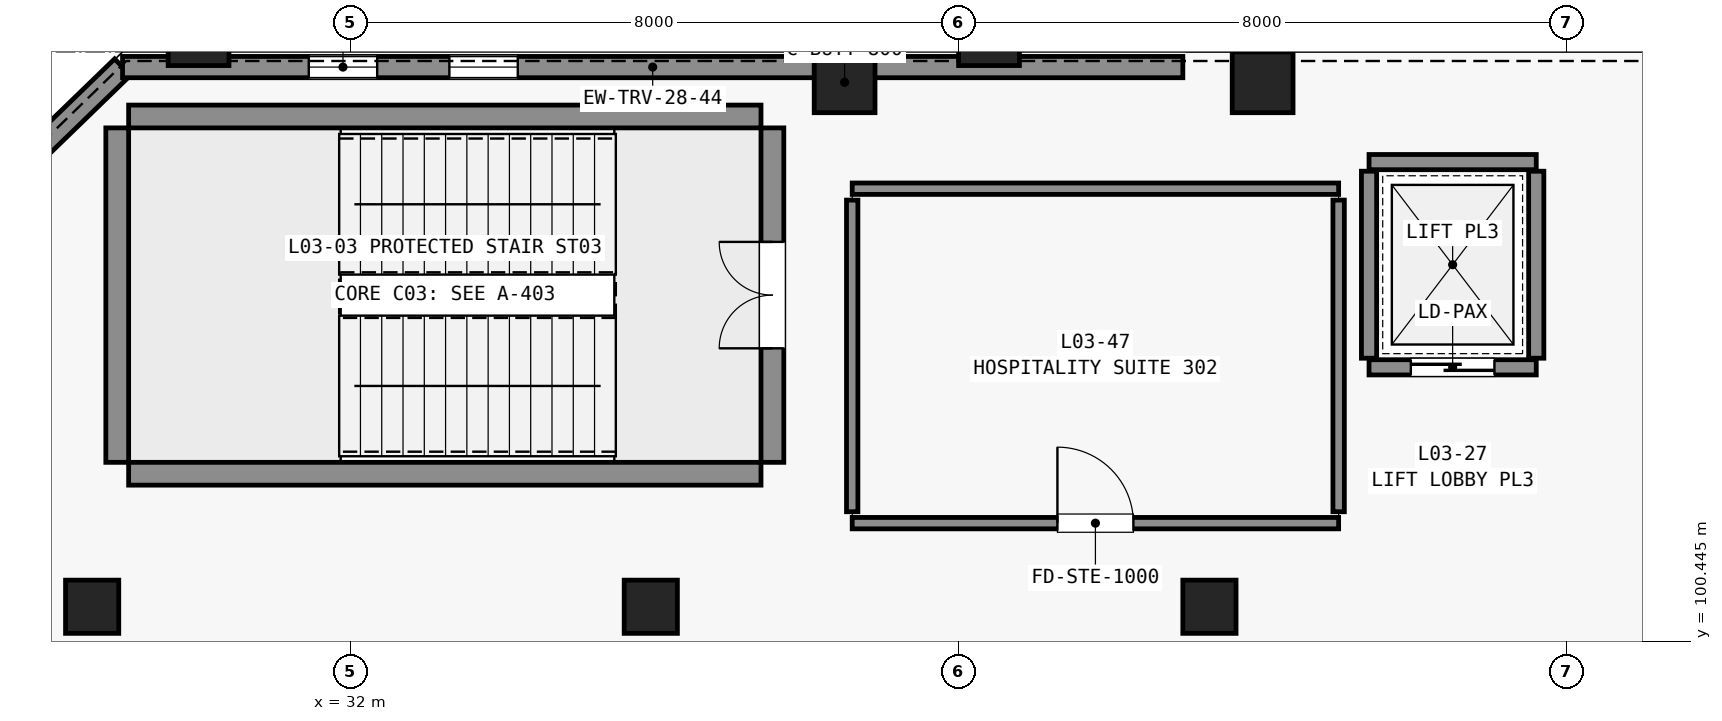
"""IFC4 building model, lengths in metres.
Left out: names, types, materials, properties, quantities, classifications, styles, units other than length and angle.
Written with IfcOpenShell. Run it as: python <this file> out.ifc"""

import sys

from ifc_helpers import new_model, si_unit, direction, frame, frame_2d, origin, origin_2d, place, context, subcontext, project, spatial, rectangle, extrude, element, fill, save


model = new_model("IFC4")
c1 = context("Model", 3, precision=1e-05, world=origin(), true_north=direction((0.0, 1.0)))
c2 = subcontext(c1, "Body", "Model", "MODEL_VIEW")
j1 = project(units=[si_unit("LENGTHUNIT", "METRE"), si_unit("PLANEANGLEUNIT", "RADIAN")], contexts=[c1])
p1 = place(None, origin())
s1 = spatial("IfcSite", under=j1, at=p1, CompositionType="ELEMENT")
p2 = place(p1, origin())
s2 = spatial("IfcBuilding", under=s1, at=p2, CompositionType="ELEMENT")
p3 = place(p2, frame((0.0, 0.0, 16.2)))
s3 = spatial("IfcBuildingStorey", under=s2, at=p3, CompositionType="ELEMENT", Elevation=16.2)
for number, where, z_axis, x_axis in (
    (1, (38.5, 107.8, 0.0), (0.0, 0.0, 1.0), (1.0, 0.0, 0.0)),
    (2, (44.0, 107.8, 0.0), (0.0, 0.0, 1.0), (1.0, 0.0, 0.0)),
):
    element("IfcColumn", number, at=place(p3, frame(where, z_axis=z_axis, x_axis=x_axis)), inside=s3, PredefinedType="PILASTER", context=c2, shape_type="SweptSolid", body=[
        extrude(rectangle(XDim=0.8, YDim=0.8, at=origin_2d()), origin(), (0.0, 0.0, 1.0), 4.8),
    ])
for number, where, z_axis, x_axis in (
    (3, (30.0, 108.42, 0.0), (0.0, 0.0, 1.0), (1.0, 0.0, 0.0)),
    (4, (40.4, 108.42, 0.0), (0.0, 0.0, 1.0), (1.0, 0.0, 0.0)),
):
    element("IfcColumn", number, at=place(p3, frame(where, z_axis=z_axis, x_axis=x_axis)), inside=s3, PredefinedType="PILASTER", context=c2, shape_type="SweptSolid", body=[
        extrude(rectangle(XDim=0.8, YDim=0.8, at=origin_2d()), origin(), (0.0, 0.0, 1.0), 4.46),
    ])
for number, where, z_axis, x_axis in (
    (5, (29.08, 102.65, 0.0), (0.0, 0.0, 1.0), (1.0, 0.0, 0.0)),
    (6, (29.08, 107.35, 0.0), (0.0, 0.0, 1.0), (1.0, 0.0, 0.0)),
):
    element("IfcWall", number, at=place(p3, frame(where, z_axis=z_axis, x_axis=x_axis)), inside=s3, PredefinedType="SHEAR", context=c2, shape_type="SweptSolid", body=[
        extrude(rectangle(XDim=8.32, YDim=0.3, at=frame_2d((4.16, 0.0))), origin(), (0.0, 0.0, 1.0), 4.8),
    ])
p4 = place(p3, frame((28.93, 102.8, 0.0), z_axis=(0.0, 0.0, 1.0), x_axis=(0.0, 1.0, 0.0)))
e7 = element("IfcWall", 7, at=p4, inside=s3, PredefinedType="SHEAR", context=c2, shape_type="SweptSolid", body=[
    extrude(rectangle(XDim=4.4, YDim=0.3, at=frame_2d((2.2, 0.0))), origin(), (0.0, 0.0, 1.0), 4.8),
])
p5 = place(p3, frame((37.55, 102.8, 0.0), z_axis=(0.0, 0.0, 1.0), x_axis=(0.0, 1.0, 0.0)))
e8 = element("IfcWall", 8, at=p5, inside=s3, PredefinedType="SHEAR", context=c2, shape_type="SweptSolid", body=[
    extrude(rectangle(XDim=4.4, YDim=0.3, at=frame_2d((2.2, 0.0))), origin(), (0.0, 0.0, 1.0), 4.8),
])
p6 = place(p5, frame((1.5, 0.0, 0.0)))
e9 = element("IfcOpeningElement", 9, at=p6, cuts=e8, PredefinedType="OPENING", context=c2, shape_type="SweptSolid", body=[
    extrude(rectangle(XDim=1.4, YDim=2.2, at=frame_2d((0.7, 1.1))), frame((0.0, 0.16, 0.0), z_axis=(0.0, -1.0, 0.0), x_axis=(1.0, 0.0, 0.0)), (0.0, 0.0, 1.0), 0.32),
])
for number, where, z_axis, x_axis in (
    (10, (43.3, 100.9, 0.0), (0.0, 0.0, 1.0), (1.0, 0.0, 0.0)),
    (11, (35.95, 100.9, 0.0), (0.0, 0.0, 1.0), (1.0, 0.0, 0.0)),
    (12, (28.6, 100.9, 0.0), (0.0, 0.0, 1.0), (1.0, 0.0, 0.0)),
):
    element("IfcColumn", number, at=place(p3, frame(where, z_axis=z_axis, x_axis=x_axis)), inside=s3, PredefinedType="COLUMN", context=c2, shape_type="SweptSolid", body=[
        extrude(rectangle(XDim=0.7, YDim=0.7, at=origin_2d()), origin(), (0.0, 0.0, 1.0), 3.25),
    ])
p7 = place(p3, frame((45.4, 104.05, 0.0), z_axis=(0.0, 0.0, 1.0), x_axis=(1.0, 0.0, 0.0)))
e13 = element("IfcWall", 13, at=p7, inside=s3, PredefinedType="STANDARD", context=c2, shape_type="SweptSolid", body=[
    extrude(rectangle(XDim=2.2, YDim=0.2, at=frame_2d((1.1, 0.0))), origin(), (0.0, 0.0, 1.0), 4.44),
])
p8 = place(p7, frame((0.55, 0.0, 0.0)))
e14 = element("IfcOpeningElement", 14, at=p8, cuts=e13, PredefinedType="OPENING", context=c2, shape_type="SweptSolid", body=[
    extrude(rectangle(XDim=1.1, YDim=2.15, at=frame_2d((0.55, 1.075))), frame((0.0, 0.11, 0.0), z_axis=(0.0, -1.0, 0.0), x_axis=(1.0, 0.0, 0.0)), (0.0, 0.0, 1.0), 0.22),
])
p9 = place(p3, frame((45.4, 106.75, 0.0), z_axis=(0.0, 0.0, 1.0), x_axis=(1.0, 0.0, 0.0)))
e15 = element("IfcWall", 15, at=p9, inside=s3, PredefinedType="STANDARD", context=c2, shape_type="SweptSolid", body=[
    extrude(rectangle(XDim=2.2, YDim=0.2, at=frame_2d((1.1, 0.0))), origin(), (0.0, 0.0, 1.0), 4.44),
])
for number, where, z_axis, x_axis in (
    (16, (45.4, 104.17, 0.0), (0.0, 0.0, 1.0), (0.0, 1.0, 0.0)),
    (17, (47.6, 104.17, 0.0), (0.0, 0.0, 1.0), (0.0, 1.0, 0.0)),
):
    element("IfcWall", number, at=place(p3, frame(where, z_axis=z_axis, x_axis=x_axis)), inside=s3, PredefinedType="STANDARD", context=c2, shape_type="SweptSolid", body=[
        extrude(rectangle(XDim=2.46, YDim=0.2, at=frame_2d((1.23, 0.0))), origin(), (0.0, 0.0, 1.0), 4.44),
    ])
p10 = place(p3, frame((29.0, 108.0, 0.0), z_axis=(0.0, 0.0, 1.0), x_axis=(-0.718244287729, -0.695791019736, 0.0)))
e18 = element("IfcWall", 18, at=p10, inside=s3, PredefinedType="STANDARD", context=c2, shape_type="SweptSolid", body=[
    extrude(rectangle(XDim=17.821, YDim=0.3, at=frame_2d((8.911, 0.0))), origin(), (0.0, 0.0, 1.0), 2.39),
])
p11 = place(p3, frame((29.0, 108.0, 0.0), z_axis=(0.0, 0.0, 1.0), x_axis=(1.0, 0.0, 0.0)))
e19 = element("IfcWall", 19, at=p11, inside=s3, PredefinedType="STANDARD", context=c2, shape_type="SweptSolid", body=[
    extrude(rectangle(XDim=13.95, YDim=0.28, at=frame_2d((6.975, 0.0))), origin(), (0.0, 0.0, 1.0), 4.44),
])
p12 = place(p11, frame((2.45, 0.0, 0.95)))
e20 = element("IfcOpeningElement", 20, at=p12, cuts=e19, PredefinedType="OPENING", context=c2, shape_type="SweptSolid", body=[
    extrude(rectangle(XDim=0.9, YDim=2.85, at=frame_2d((0.45, 1.425))), frame((0.0, 0.15, 0.0), z_axis=(0.0, -1.0, 0.0), x_axis=(1.0, 0.0, 0.0)), (0.0, 0.0, 1.0), 0.3),
])
p13 = place(p11, frame((4.3, 0.0, 0.95)))
e21 = element("IfcOpeningElement", 21, at=p13, cuts=e19, PredefinedType="OPENING", context=c2, shape_type="SweptSolid", body=[
    extrude(rectangle(XDim=0.9, YDim=2.85, at=frame_2d((0.45, 1.425))), frame((0.0, 0.15, 0.0), z_axis=(0.0, -1.0, 0.0), x_axis=(1.0, 0.0, 0.0)), (0.0, 0.0, 1.0), 0.3),
])
p14 = place(p3, frame((38.6, 102.0, 0.0), z_axis=(0.0, 0.0, 1.0), x_axis=(1.0, 0.0, 0.0)))
e22 = element("IfcWall", 22, at=p14, inside=s3, PredefinedType="STANDARD", context=c2, shape_type="SweptSolid", body=[
    extrude(rectangle(XDim=6.4, YDim=0.15, at=frame_2d((3.2, 0.0))), origin(), (0.0, 0.0, 1.0), 4.44),
])
p15 = place(p14, frame((2.7, 0.0, 0.0)))
e23 = element("IfcOpeningElement", 23, at=p15, cuts=e22, PredefinedType="OPENING", context=c2, shape_type="SweptSolid", body=[
    extrude(rectangle(XDim=1.0, YDim=2.15, at=frame_2d((0.5, 1.075))), frame((0.0, 0.085, 0.0), z_axis=(0.0, -1.0, 0.0), x_axis=(1.0, 0.0, 0.0)), (0.0, 0.0, 1.0), 0.17),
])
p16 = place(p3, frame((38.6, 106.4, 0.0), z_axis=(0.0, 0.0, 1.0), x_axis=(1.0, 0.0, 0.0)))
e24 = element("IfcWall", 24, at=p16, inside=s3, PredefinedType="STANDARD", context=c2, shape_type="SweptSolid", body=[
    extrude(rectangle(XDim=6.4, YDim=0.15, at=frame_2d((3.2, 0.0))), origin(), (0.0, 0.0, 1.0), 4.44),
])
for number, where, z_axis, x_axis in (
    (25, (38.6, 102.15, 0.0), (0.0, 0.0, 1.0), (0.0, 1.0, 0.0)),
    (26, (45.0, 102.15, 0.0), (0.0, 0.0, 1.0), (0.0, 1.0, 0.0)),
):
    element("IfcWall", number, at=place(p3, frame(where, z_axis=z_axis, x_axis=x_axis)), inside=s3, PredefinedType="STANDARD", context=c2, shape_type="SweptSolid", body=[
        extrude(rectangle(XDim=4.1, YDim=0.15, at=frame_2d((2.05, 0.0))), origin(), (0.0, 0.0, 1.0), 4.44),
    ])
p17 = place(p8, origin())
e27 = element("IfcDoor", 27, at=p17, inside=s3, OperationType="SLIDING_TO_LEFT", PredefinedType="DOOR", context=c2, shape_type="SweptSolid", body=[
    extrude(rectangle(XDim=1.1, YDim=2.15, at=frame_2d((0.55, 1.075))), frame((0.0, 0.025, 0.0), z_axis=(0.0, -1.0, 0.0), x_axis=(1.0, 0.0, 0.0)), (0.0, 0.0, 1.0), 0.05),
])
fill(e14, e27)
p18 = place(p12, origin())
e28 = element("IfcWindow", 28, at=p18, inside=s3, PartitioningType="DOUBLE_PANEL_VERTICAL", PredefinedType="WINDOW", context=c2, shape_type="SweptSolid", body=[
    extrude(rectangle(XDim=0.9, YDim=2.85, at=frame_2d((0.45, 1.425))), frame((0.0, 0.03, 0.0), z_axis=(0.0, -1.0, 0.0), x_axis=(1.0, 0.0, 0.0)), (0.0, 0.0, 1.0), 0.06),
])
fill(e20, e28)
p19 = place(p13, origin())
e29 = element("IfcWindow", 29, at=p19, inside=s3, PartitioningType="DOUBLE_PANEL_VERTICAL", PredefinedType="WINDOW", context=c2, shape_type="SweptSolid", body=[
    extrude(rectangle(XDim=0.9, YDim=2.85, at=frame_2d((0.45, 1.425))), frame((0.0, 0.03, 0.0), z_axis=(0.0, -1.0, 0.0), x_axis=(1.0, 0.0, 0.0)), (0.0, 0.0, 1.0), 0.06),
])
fill(e21, e29)
p20 = place(p6, origin())
e30 = element("IfcDoor", 30, at=p20, inside=s3, OperationType="DOUBLE_DOOR_SINGLE_SWING", PredefinedType="DOOR", context=c2, shape_type="SweptSolid", body=[
    extrude(rectangle(XDim=1.4, YDim=2.2, at=frame_2d((0.7, 1.1))), frame((0.0, 0.025, 0.0), z_axis=(0.0, -1.0, 0.0), x_axis=(1.0, 0.0, 0.0)), (0.0, 0.0, 1.0), 0.05),
])
fill(e9, e30)
p21 = place(p15, origin())
e31 = element("IfcDoor", 31, at=p21, inside=s3, OperationType="SINGLE_SWING_LEFT", PredefinedType="DOOR", context=c2, shape_type="SweptSolid", body=[
    extrude(rectangle(XDim=1.0, YDim=2.15, at=frame_2d((0.5, 1.075))), frame((0.0, 0.025, 0.0), z_axis=(0.0, -1.0, 0.0), x_axis=(1.0, 0.0, 0.0)), (0.0, 0.0, 1.0), 0.05),
])
fill(e23, e31)
save(model, sys.argv[1])
